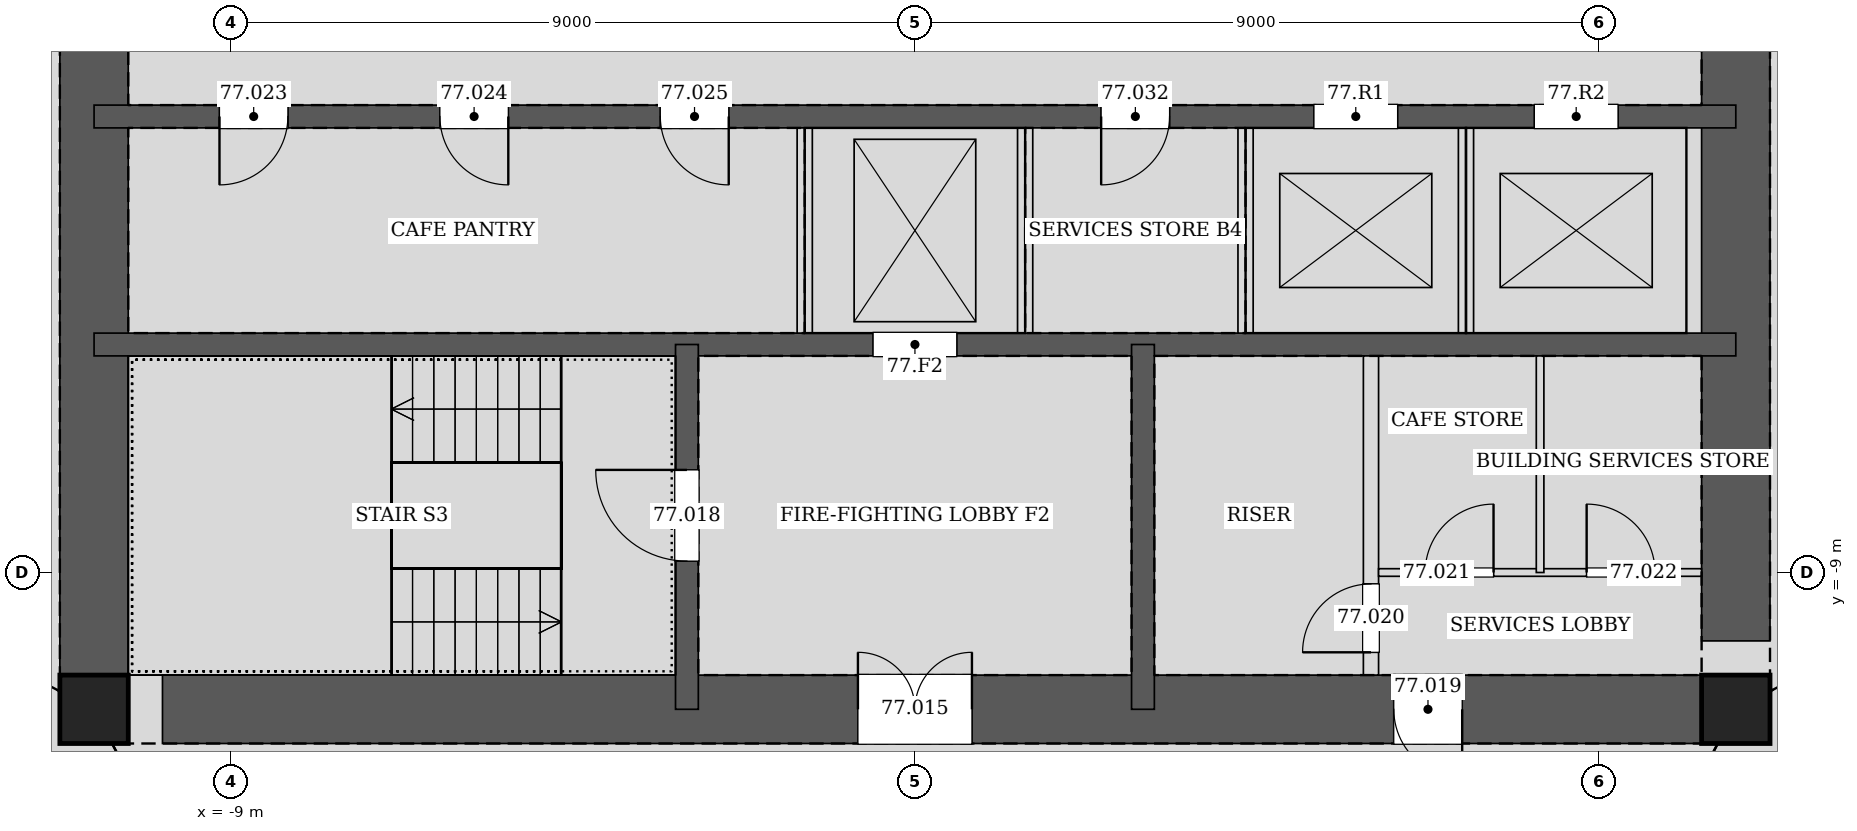
"""IFC4 building model, lengths in metres.
Left out: names, types, materials, properties, quantities, classifications, styles, units other than length and angle.
Written with IfcOpenShell. Run it as: python <this file> out.ifc"""

import sys

from ifc_helpers import new_model, si_unit, direction, frame, frame_2d, origin, origin_2d, place, context, subcontext, project, spatial, rectangle, hollow_rectangle, extrude, element, fill, save


model = new_model("IFC4")
c1 = context("Model", 3, precision=1e-05, world=origin(), true_north=direction((0.0, 1.0)))
c2 = subcontext(c1, "Body", "Model", "MODEL_VIEW")
j1 = project(units=[si_unit("LENGTHUNIT", "METRE"), si_unit("PLANEANGLEUNIT", "RADIAN")], contexts=[c1])
p1 = place(None, origin())
s1 = spatial("IfcSite", under=j1, at=p1, CompositionType="ELEMENT")
p2 = place(p1, origin())
s2 = spatial("IfcBuilding", under=s1, at=p2, CompositionType="ELEMENT")
p3 = place(p2, frame((0.0, 0.0, 311.6)))
s3 = spatial("IfcBuildingStorey", under=s2, at=p3, CompositionType="ELEMENT", Elevation=311.6)
for number, where, z_axis, x_axis in (
    (1, (-10.8, -10.8, 0.0), (0.0, 0.0, 1.0), (1.0, 0.0, 0.0)),
    (2, (10.8, -10.8, 0.0), (0.0, 0.0, 1.0), (1.0, 0.0, 0.0)),
):
    element("IfcColumn", number, at=place(p3, frame(where, z_axis=z_axis, x_axis=x_axis)), inside=s3, PredefinedType="COLUMN", context=c2, shape_type="SweptSolid", body=[
        extrude(hollow_rectangle(XDim=0.9, YDim=0.9, WallThickness=0.04, at=origin_2d()), origin(), (0.0, 0.0, 1.0), 6.0),
    ])
p4 = place(p3, frame((-10.8, -10.8, 0.0), z_axis=(0.0, 0.0, 1.0), x_axis=(1.0, 0.0, 0.0)))
e3 = element("IfcWall", 3, at=p4, inside=s3, PredefinedType="SOLIDWALL", context=c2, shape_type="SweptSolid", body=[
    extrude(rectangle(XDim=21.6, YDim=0.9, at=frame_2d((10.8, 0.0))), origin(), (0.0, 0.0, 1.0), 6.0),
])
p5 = place(p4, frame((10.05, 0.0, 0.0)))
e4 = element("IfcOpeningElement", 4, at=p5, cuts=e3, PredefinedType="OPENING", context=c2, shape_type="SweptSolid", body=[
    extrude(rectangle(XDim=1.5, YDim=2.1, at=frame_2d((0.75, 1.05))), frame((0.0, 0.46, 0.0), z_axis=(0.0, -1.0, 0.0), x_axis=(1.0, 0.0, 0.0)), (0.0, 0.0, 1.0), 0.92),
])
p6 = place(p4, frame((17.1, 0.0, 0.0)))
e5 = element("IfcOpeningElement", 5, at=p6, cuts=e3, PredefinedType="OPENING", context=c2, shape_type="SweptSolid", body=[
    extrude(rectangle(XDim=0.9, YDim=2.1, at=frame_2d((0.45, 1.05))), frame((0.0, 0.46, 0.0), z_axis=(0.0, -1.0, 0.0), x_axis=(1.0, 0.0, 0.0)), (0.0, 0.0, 1.0), 0.92),
])
p7 = place(p3, frame((10.8, -10.8, 0.0), z_axis=(0.0, 0.0, 1.0), x_axis=(0.0, 1.0, 0.0)))
e6 = element("IfcWall", 6, at=p7, inside=s3, PredefinedType="SOLIDWALL", context=c2, shape_type="SweptSolid", body=[
    extrude(rectangle(XDim=21.6, YDim=0.9, at=frame_2d((10.8, 0.0))), origin(), (0.0, 0.0, 1.0), 6.0),
])
p8 = place(p7, frame((11.7, 0.0, 0.0)))
e7 = element("IfcOpeningElement", 7, at=p8, cuts=e6, PredefinedType="OPENING", context=c2, shape_type="SweptSolid", body=[
    extrude(rectangle(XDim=1.2, YDim=2.1, at=frame_2d((0.6, 1.05))), frame((0.0, 0.46, 0.0), z_axis=(0.0, -1.0, 0.0), x_axis=(1.0, 0.0, 0.0)), (0.0, 0.0, 1.0), 0.92),
])
p9 = place(p7, frame((8.7, 0.0, 0.0)))
e8 = element("IfcOpeningElement", 8, at=p9, cuts=e6, PredefinedType="OPENING", context=c2, shape_type="SweptSolid", body=[
    extrude(rectangle(XDim=1.2, YDim=2.1, at=frame_2d((0.6, 1.05))), frame((0.0, 0.46, 0.0), z_axis=(0.0, -1.0, 0.0), x_axis=(1.0, 0.0, 0.0)), (0.0, 0.0, 1.0), 0.92),
])
p10 = place(p3, frame((-10.8, 10.8, 0.0), z_axis=(0.0, 0.0, 1.0), x_axis=(0.0, -1.0, 0.0)))
e9 = element("IfcWall", 9, at=p10, inside=s3, PredefinedType="SOLIDWALL", context=c2, shape_type="SweptSolid", body=[
    extrude(rectangle(XDim=21.6, YDim=0.9, at=frame_2d((10.8, 0.0))), origin(), (0.0, 0.0, 1.0), 6.0),
])
p11 = place(p10, frame((8.7, 0.0, 0.0)))
e10 = element("IfcOpeningElement", 10, at=p11, cuts=e9, PredefinedType="OPENING", context=c2, shape_type="SweptSolid", body=[
    extrude(rectangle(XDim=1.2, YDim=2.1, at=frame_2d((0.6, 1.05))), frame((0.0, 0.46, 0.0), z_axis=(0.0, -1.0, 0.0), x_axis=(1.0, 0.0, 0.0)), (0.0, 0.0, 1.0), 0.92),
])
p12 = place(p10, frame((11.7, 0.0, 0.0)))
e11 = element("IfcOpeningElement", 11, at=p12, cuts=e9, PredefinedType="OPENING", context=c2, shape_type="SweptSolid", body=[
    extrude(rectangle(XDim=1.2, YDim=2.1, at=frame_2d((0.6, 1.05))), frame((0.0, 0.46, 0.0), z_axis=(0.0, -1.0, 0.0), x_axis=(1.0, 0.0, 0.0)), (0.0, 0.0, 1.0), 0.92),
])
p13 = place(p3, frame((-10.8, -3.0, 0.0), z_axis=(0.0, 0.0, 1.0), x_axis=(1.0, 0.0, 0.0)))
e12 = element("IfcWall", 12, at=p13, inside=s3, PredefinedType="SOLIDWALL", context=c2, shape_type="SweptSolid", body=[
    extrude(rectangle(XDim=21.6, YDim=0.3, at=frame_2d((10.8, 0.0))), origin(), (0.0, 0.0, 1.0), 6.0),
])
p14 = place(p13, frame((1.65, 0.0, 0.0)))
e13 = element("IfcOpeningElement", 13, at=p14, cuts=e12, PredefinedType="OPENING", context=c2, shape_type="SweptSolid", body=[
    extrude(rectangle(XDim=0.9, YDim=2.1, at=frame_2d((0.45, 1.05))), frame((0.0, 0.16, 0.0), z_axis=(0.0, -1.0, 0.0), x_axis=(1.0, 0.0, 0.0)), (0.0, 0.0, 1.0), 0.32),
])
p15 = place(p13, frame((4.55, 0.0, 0.0)))
e14 = element("IfcOpeningElement", 14, at=p15, cuts=e12, PredefinedType="OPENING", context=c2, shape_type="SweptSolid", body=[
    extrude(rectangle(XDim=0.9, YDim=2.1, at=frame_2d((0.45, 1.05))), frame((0.0, 0.16, 0.0), z_axis=(0.0, -1.0, 0.0), x_axis=(1.0, 0.0, 0.0)), (0.0, 0.0, 1.0), 0.32),
])
p16 = place(p13, frame((7.45, 0.0, 0.0)))
e15 = element("IfcOpeningElement", 15, at=p16, cuts=e12, PredefinedType="OPENING", context=c2, shape_type="SweptSolid", body=[
    extrude(rectangle(XDim=0.9, YDim=2.1, at=frame_2d((0.45, 1.05))), frame((0.0, 0.16, 0.0), z_axis=(0.0, -1.0, 0.0), x_axis=(1.0, 0.0, 0.0)), (0.0, 0.0, 1.0), 0.32),
])
p17 = place(p13, frame((13.25, 0.0, 0.0)))
e16 = element("IfcOpeningElement", 16, at=p17, cuts=e12, PredefinedType="OPENING", context=c2, shape_type="SweptSolid", body=[
    extrude(rectangle(XDim=0.9, YDim=2.1, at=frame_2d((0.45, 1.05))), frame((0.0, 0.16, 0.0), z_axis=(0.0, -1.0, 0.0), x_axis=(1.0, 0.0, 0.0)), (0.0, 0.0, 1.0), 0.32),
])
p18 = place(p13, frame((16.05, 0.0, 0.0)))
e17 = element("IfcOpeningElement", 17, at=p18, cuts=e12, PredefinedType="OPENING", context=c2, shape_type="SweptSolid", body=[
    extrude(rectangle(XDim=1.1, YDim=2.1, at=frame_2d((0.55, 1.05))), frame((0.0, 0.16, 0.0), z_axis=(0.0, -1.0, 0.0), x_axis=(1.0, 0.0, 0.0)), (0.0, 0.0, 1.0), 0.32),
])
p19 = place(p13, frame((18.95, 0.0, 0.0)))
e18 = element("IfcOpeningElement", 18, at=p19, cuts=e12, PredefinedType="OPENING", context=c2, shape_type="SweptSolid", body=[
    extrude(rectangle(XDim=1.1, YDim=2.1, at=frame_2d((0.55, 1.05))), frame((0.0, 0.16, 0.0), z_axis=(0.0, -1.0, 0.0), x_axis=(1.0, 0.0, 0.0)), (0.0, 0.0, 1.0), 0.32),
])
p20 = place(p3, frame((-10.8, -6.0, 0.0), z_axis=(0.0, 0.0, 1.0), x_axis=(1.0, 0.0, 0.0)))
e19 = element("IfcWall", 19, at=p20, inside=s3, PredefinedType="SOLIDWALL", context=c2, shape_type="SweptSolid", body=[
    extrude(rectangle(XDim=21.6, YDim=0.3, at=frame_2d((10.8, 0.0))), origin(), (0.0, 0.0, 1.0), 6.0),
])
p21 = place(p20, frame((10.25, 0.0, 0.0)))
e20 = element("IfcOpeningElement", 20, at=p21, cuts=e19, PredefinedType="OPENING", context=c2, shape_type="SweptSolid", body=[
    extrude(rectangle(XDim=1.1, YDim=2.1, at=frame_2d((0.55, 1.05))), frame((0.0, 0.16, 0.0), z_axis=(0.0, -1.0, 0.0), x_axis=(1.0, 0.0, 0.0)), (0.0, 0.0, 1.0), 0.32),
])
p22 = place(p3, frame((-3.0, -6.0, 0.0), z_axis=(0.0, 0.0, 1.0), x_axis=(0.0, -1.0, 0.0)))
e21 = element("IfcWall", 21, at=p22, inside=s3, PredefinedType="SOLIDWALL", context=c2, shape_type="SweptSolid", body=[
    extrude(rectangle(XDim=4.8, YDim=0.3, at=frame_2d((2.4, 0.0))), origin(), (0.0, 0.0, 1.0), 6.0),
])
p23 = place(p22, frame((1.65, 0.0, 0.0)))
e22 = element("IfcOpeningElement", 22, at=p23, cuts=e21, PredefinedType="OPENING", context=c2, shape_type="SweptSolid", body=[
    extrude(rectangle(XDim=1.2, YDim=2.1, at=frame_2d((0.6, 1.05))), frame((0.0, 0.16, 0.0), z_axis=(0.0, -1.0, 0.0), x_axis=(1.0, 0.0, 0.0)), (0.0, 0.0, 1.0), 0.32),
])
p24 = place(p3, frame((3.0, -6.0, 0.0), z_axis=(0.0, 0.0, 1.0), x_axis=(0.0, -1.0, 0.0)))
e23 = element("IfcWall", 23, at=p24, inside=s3, PredefinedType="SOLIDWALL", context=c2, shape_type="SweptSolid", body=[
    extrude(rectangle(XDim=4.8, YDim=0.3, at=frame_2d((2.4, 0.0))), origin(), (0.0, 0.0, 1.0), 6.0),
])
for number, where, z_axis, x_axis in (
    (24, (-1.45, -5.85, 0.0), (0.0, 0.0, 1.0), (0.0, 1.0, 0.0)),
    (25, (1.45, -5.85, 0.0), (0.0, 0.0, 1.0), (0.0, 1.0, 0.0)),
    (26, (4.35, -5.85, 0.0), (0.0, 0.0, 1.0), (0.0, 1.0, 0.0)),
    (27, (7.25, -5.85, 0.0), (0.0, 0.0, 1.0), (0.0, 1.0, 0.0)),
):
    element("IfcWall", number, at=place(p3, frame(where, z_axis=z_axis, x_axis=x_axis)), inside=s3, PredefinedType="PARTITIONING", context=c2, shape_type="SweptSolid", body=[
        extrude(rectangle(XDim=2.7, YDim=0.2, at=frame_2d((1.35, 0.0))), origin(), (0.0, 0.0, 1.0), 5.75),
    ])
p25 = place(p3, frame((6.0, -10.35, 0.0), z_axis=(0.0, 0.0, 1.0), x_axis=(0.0, 1.0, 0.0)))
e28 = element("IfcWall", 28, at=p25, inside=s3, PredefinedType="PARTITIONING", context=c2, shape_type="SweptSolid", body=[
    extrude(rectangle(XDim=4.2, YDim=0.2, at=frame_2d((2.1, 0.0))), origin(), (0.0, 0.0, 1.0), 5.75),
])
p26 = place(p25, frame((0.3, 0.0, 0.0)))
e29 = element("IfcOpeningElement", 29, at=p26, cuts=e28, PredefinedType="OPENING", context=c2, shape_type="SweptSolid", body=[
    extrude(rectangle(XDim=0.9, YDim=2.1, at=frame_2d((0.45, 1.05))), frame((0.0, 0.11, 0.0), z_axis=(0.0, -1.0, 0.0), x_axis=(1.0, 0.0, 0.0)), (0.0, 0.0, 1.0), 0.22),
])
p27 = place(p3, frame((6.1, -9.0, 0.0), z_axis=(0.0, 0.0, 1.0), x_axis=(1.0, 0.0, 0.0)))
e30 = element("IfcWall", 30, at=p27, inside=s3, PredefinedType="PARTITIONING", context=c2, shape_type="SweptSolid", body=[
    extrude(rectangle(XDim=4.25, YDim=0.1, at=frame_2d((2.125, 0.0))), origin(), (0.0, 0.0, 1.0), 5.75),
])
p28 = place(p27, frame((0.613, 0.0, 0.0)))
e31 = element("IfcOpeningElement", 31, at=p28, cuts=e30, PredefinedType="OPENING", context=c2, shape_type="SweptSolid", body=[
    extrude(rectangle(XDim=0.9, YDim=2.1, at=frame_2d((0.45, 1.05))), frame((0.0, 0.06, 0.0), z_axis=(0.0, -1.0, 0.0), x_axis=(1.0, 0.0, 0.0)), (0.0, 0.0, 1.0), 0.12),
])
p29 = place(p27, frame((2.738, 0.0, 0.0)))
e32 = element("IfcOpeningElement", 32, at=p29, cuts=e30, PredefinedType="OPENING", context=c2, shape_type="SweptSolid", body=[
    extrude(rectangle(XDim=0.9, YDim=2.1, at=frame_2d((0.45, 1.05))), frame((0.0, 0.06, 0.0), z_axis=(0.0, -1.0, 0.0), x_axis=(1.0, 0.0, 0.0)), (0.0, 0.0, 1.0), 0.12),
])
p30 = place(p3, frame((8.225, -9.0, 0.0), z_axis=(0.0, 0.0, 1.0), x_axis=(0.0, 1.0, 0.0)))
e33 = element("IfcWall", 33, at=p30, inside=s3, PredefinedType="PARTITIONING", context=c2, shape_type="SweptSolid", body=[
    extrude(rectangle(XDim=2.85, YDim=0.1, at=frame_2d((1.425, 0.0))), origin(), (0.0, 0.0, 1.0), 5.75),
])
p31 = place(p5, origin())
e34 = element("IfcDoor", 34, at=p31, inside=s3, OperationType="DOUBLE_DOOR_SINGLE_SWING", PredefinedType="DOOR", context=c2, shape_type="SweptSolid", body=[
    extrude(rectangle(XDim=1.5, YDim=2.1, at=frame_2d((0.75, 1.05))), frame((0.0, 0.025, 0.0), z_axis=(0.0, -1.0, 0.0), x_axis=(1.0, 0.0, 0.0)), (0.0, 0.0, 1.0), 0.05),
])
fill(e4, e34)
p32 = place(p23, frame((1.2, 0.0, 0.0), z_axis=(0.0, 0.0, 1.0), x_axis=(-1.0, 0.0, 0.0)))
e35 = element("IfcDoor", 35, at=p32, inside=s3, OperationType="SINGLE_SWING_RIGHT", PredefinedType="DOOR", context=c2, shape_type="SweptSolid", body=[
    extrude(rectangle(XDim=1.2, YDim=2.1, at=frame_2d((0.6, 1.05))), frame((0.0, 0.025, 0.0), z_axis=(0.0, -1.0, 0.0), x_axis=(1.0, 0.0, 0.0)), (0.0, 0.0, 1.0), 0.05),
])
fill(e22, e35)
p33 = place(p6, frame((0.9, 0.0, 0.0), z_axis=(0.0, 0.0, 1.0), x_axis=(-1.0, 0.0, 0.0)))
e36 = element("IfcDoor", 36, at=p33, inside=s3, OperationType="SINGLE_SWING_LEFT", PredefinedType="DOOR", context=c2, shape_type="SweptSolid", body=[
    extrude(rectangle(XDim=0.9, YDim=2.1, at=frame_2d((0.45, 1.05))), frame((0.0, 0.025, 0.0), z_axis=(0.0, -1.0, 0.0), x_axis=(1.0, 0.0, 0.0)), (0.0, 0.0, 1.0), 0.05),
])
fill(e5, e36)
p34 = place(p26, origin())
e37 = element("IfcDoor", 37, at=p34, inside=s3, OperationType="SINGLE_SWING_LEFT", PredefinedType="DOOR", context=c2, shape_type="SweptSolid", body=[
    extrude(rectangle(XDim=0.9, YDim=2.1, at=frame_2d((0.45, 1.05))), frame((0.0, 0.025, 0.0), z_axis=(0.0, -1.0, 0.0), x_axis=(1.0, 0.0, 0.0)), (0.0, 0.0, 1.0), 0.05),
])
fill(e29, e37)
p35 = place(p28, origin())
e38 = element("IfcDoor", 38, at=p35, inside=s3, OperationType="SINGLE_SWING_RIGHT", PredefinedType="DOOR", context=c2, shape_type="SweptSolid", body=[
    extrude(rectangle(XDim=0.9, YDim=2.1, at=frame_2d((0.45, 1.05))), frame((0.0, 0.025, 0.0), z_axis=(0.0, -1.0, 0.0), x_axis=(1.0, 0.0, 0.0)), (0.0, 0.0, 1.0), 0.05),
])
fill(e31, e38)
p36 = place(p29, origin())
e39 = element("IfcDoor", 39, at=p36, inside=s3, OperationType="SINGLE_SWING_LEFT", PredefinedType="DOOR", context=c2, shape_type="SweptSolid", body=[
    extrude(rectangle(XDim=0.9, YDim=2.1, at=frame_2d((0.45, 1.05))), frame((0.0, 0.025, 0.0), z_axis=(0.0, -1.0, 0.0), x_axis=(1.0, 0.0, 0.0)), (0.0, 0.0, 1.0), 0.05),
])
fill(e32, e39)
p37 = place(p14, frame((0.9, 0.0, 0.0), z_axis=(0.0, 0.0, 1.0), x_axis=(-1.0, 0.0, 0.0)))
e40 = element("IfcDoor", 40, at=p37, inside=s3, OperationType="SINGLE_SWING_RIGHT", PredefinedType="DOOR", context=c2, shape_type="SweptSolid", body=[
    extrude(rectangle(XDim=0.9, YDim=2.1, at=frame_2d((0.45, 1.05))), frame((0.0, 0.025, 0.0), z_axis=(0.0, -1.0, 0.0), x_axis=(1.0, 0.0, 0.0)), (0.0, 0.0, 1.0), 0.05),
])
fill(e13, e40)
p38 = place(p15, frame((0.9, 0.0, 0.0), z_axis=(0.0, 0.0, 1.0), x_axis=(-1.0, 0.0, 0.0)))
e41 = element("IfcDoor", 41, at=p38, inside=s3, OperationType="SINGLE_SWING_LEFT", PredefinedType="DOOR", context=c2, shape_type="SweptSolid", body=[
    extrude(rectangle(XDim=0.9, YDim=2.1, at=frame_2d((0.45, 1.05))), frame((0.0, 0.025, 0.0), z_axis=(0.0, -1.0, 0.0), x_axis=(1.0, 0.0, 0.0)), (0.0, 0.0, 1.0), 0.05),
])
fill(e14, e41)
p39 = place(p16, frame((0.9, 0.0, 0.0), z_axis=(0.0, 0.0, 1.0), x_axis=(-1.0, 0.0, 0.0)))
e42 = element("IfcDoor", 42, at=p39, inside=s3, OperationType="SINGLE_SWING_LEFT", PredefinedType="DOOR", context=c2, shape_type="SweptSolid", body=[
    extrude(rectangle(XDim=0.9, YDim=2.1, at=frame_2d((0.45, 1.05))), frame((0.0, 0.025, 0.0), z_axis=(0.0, -1.0, 0.0), x_axis=(1.0, 0.0, 0.0)), (0.0, 0.0, 1.0), 0.05),
])
fill(e15, e42)
p40 = place(p17, frame((0.9, 0.0, 0.0), z_axis=(0.0, 0.0, 1.0), x_axis=(-1.0, 0.0, 0.0)))
e43 = element("IfcDoor", 43, at=p40, inside=s3, OperationType="SINGLE_SWING_RIGHT", PredefinedType="DOOR", context=c2, shape_type="SweptSolid", body=[
    extrude(rectangle(XDim=0.9, YDim=2.1, at=frame_2d((0.45, 1.05))), frame((0.0, 0.025, 0.0), z_axis=(0.0, -1.0, 0.0), x_axis=(1.0, 0.0, 0.0)), (0.0, 0.0, 1.0), 0.05),
])
fill(e16, e43)
p41 = place(p21, origin())
e44 = element("IfcDoor", 44, at=p41, inside=s3, OperationType="DOUBLE_DOOR_SLIDING", PredefinedType="DOOR", context=c2, shape_type="SweptSolid", body=[
    extrude(rectangle(XDim=1.1, YDim=2.1, at=frame_2d((0.55, 1.05))), frame((0.0, 0.025, 0.0), z_axis=(0.0, -1.0, 0.0), x_axis=(1.0, 0.0, 0.0)), (0.0, 0.0, 1.0), 0.05),
])
fill(e20, e44)
p42 = place(p18, origin())
e45 = element("IfcDoor", 45, at=p42, inside=s3, OperationType="DOUBLE_DOOR_SLIDING", PredefinedType="DOOR", context=c2, shape_type="SweptSolid", body=[
    extrude(rectangle(XDim=1.1, YDim=2.1, at=frame_2d((0.55, 1.05))), frame((0.0, 0.025, 0.0), z_axis=(0.0, -1.0, 0.0), x_axis=(1.0, 0.0, 0.0)), (0.0, 0.0, 1.0), 0.05),
])
fill(e17, e45)
p43 = place(p19, origin())
e46 = element("IfcDoor", 46, at=p43, inside=s3, OperationType="DOUBLE_DOOR_SLIDING", PredefinedType="DOOR", context=c2, shape_type="SweptSolid", body=[
    extrude(rectangle(XDim=1.1, YDim=2.1, at=frame_2d((0.55, 1.05))), frame((0.0, 0.025, 0.0), z_axis=(0.0, -1.0, 0.0), x_axis=(1.0, 0.0, 0.0)), (0.0, 0.0, 1.0), 0.05),
])
fill(e18, e46)
save(model, sys.argv[1])
